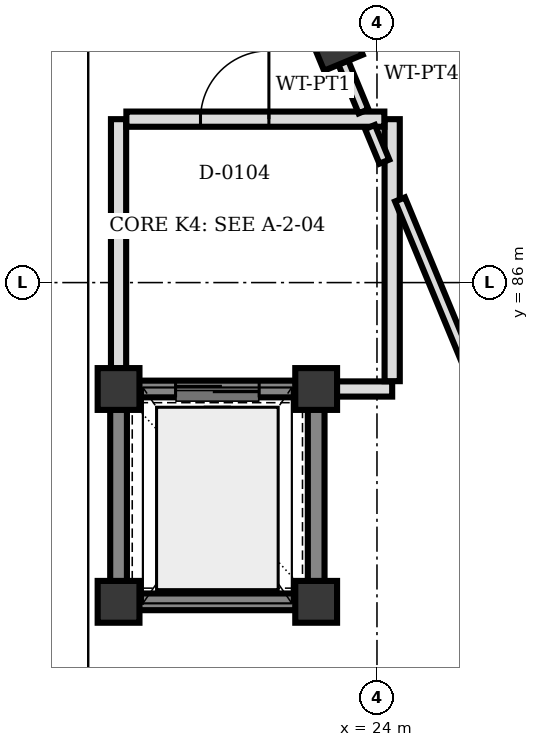
"""IFC4 building model, lengths in metres.
Left out: names, types, materials, properties, quantities, classifications, styles, units other than length and angle.
Written with IfcOpenShell. Run it as: python <this file> out.ifc"""

import sys

from ifc_helpers import new_model, si_unit, direction, frame, frame_2d, origin, origin_2d, place, context, subcontext, project, spatial, rectangle, extrude, element, fill, save


model = new_model("IFC4")
c1 = context("Model", 3, precision=1e-05, world=origin(), true_north=direction((0.0, 1.0)))
c2 = subcontext(c1, "Body", "Model", "MODEL_VIEW")
j1 = project(units=[si_unit("LENGTHUNIT", "METRE"), si_unit("PLANEANGLEUNIT", "RADIAN")], contexts=[c1])
p1 = place(None, origin())
s1 = spatial("IfcSite", under=j1, at=p1, CompositionType="ELEMENT")
p2 = place(p1, origin())
s2 = spatial("IfcBuilding", under=s1, at=p2, CompositionType="ELEMENT")
p3 = place(p2, frame((0.0, 0.0, 12.5)))
s3 = spatial("IfcBuildingStorey", under=s2, at=p3, CompositionType="ELEMENT", Elevation=12.5)
for number, where, z_axis, x_axis in (
    (1, (20.6, 81.8, 0.0), (0.0, 0.0, 1.0), (1.0, 0.0, 0.0)),
    (2, (23.2, 81.8, 0.0), (0.0, 0.0, 1.0), (1.0, 0.0, 0.0)),
    (3, (23.2, 84.6, 0.0), (0.0, 0.0, 1.0), (1.0, 0.0, 0.0)),
    (4, (20.6, 84.6, 0.0), (0.0, 0.0, 1.0), (1.0, 0.0, 0.0)),
):
    element("IfcColumn", number, at=place(p3, frame(where, z_axis=z_axis, x_axis=x_axis)), inside=s3, PredefinedType="COLUMN", context=c2, shape_type="SweptSolid", body=[
        extrude(rectangle(XDim=0.55, YDim=0.55, at=origin_2d()), origin(), (0.0, 0.0, 1.0), 4.0),
    ])
p4 = place(p3, frame((23.453, 89.147, 0.0), z_axis=(0.0, 0.0, 1.0), x_axis=(0.382683432365, -0.923879532511, 0.0)))
e5 = element("IfcColumn", 5, at=p4, inside=s3, PredefinedType="COLUMN", context=c2, shape_type="SweptSolid", body=[
    extrude(rectangle(XDim=0.55, YDim=0.55, at=origin_2d()), origin(), (0.0, 0.0, 1.0), 4.49),
])
p5 = place(p3, frame((20.867, 81.8, 0.0), z_axis=(0.0, 0.0, 1.0), x_axis=(1.0, 0.0, 0.0)))
e6 = element("IfcWall", 6, at=p5, inside=s3, PredefinedType="SHEAR", context=c2, shape_type="SweptSolid", body=[
    extrude(rectangle(XDim=2.066, YDim=0.22, at=frame_2d((1.033, 0.0))), origin(), (0.0, 0.0, 1.0), 3.74),
])
p6 = place(p3, frame((23.2, 82.067, 0.0), z_axis=(0.0, 0.0, 1.0), x_axis=(0.0, 1.0, 0.0)))
e7 = element("IfcWall", 7, at=p6, inside=s3, PredefinedType="SHEAR", context=c2, shape_type="SweptSolid", body=[
    extrude(rectangle(XDim=2.266, YDim=0.22, at=frame_2d((1.133, 0.0))), origin(), (0.0, 0.0, 1.0), 3.74),
])
p7 = place(p3, frame((22.933, 84.6, 0.0), z_axis=(0.0, 0.0, 1.0), x_axis=(-1.0, 0.0, 0.0)))
e8 = element("IfcWall", 8, at=p7, inside=s3, PredefinedType="SHEAR", context=c2, shape_type="SweptSolid", body=[
    extrude(rectangle(XDim=2.066, YDim=0.22, at=frame_2d((1.033, 0.0))), origin(), (0.0, 0.0, 1.0), 3.74),
])
p8 = place(p7, frame((0.483, 0.0, 0.0)))
e9 = element("IfcOpeningElement", 9, at=p8, cuts=e8, PredefinedType="OPENING", context=c2, shape_type="SweptSolid", body=[
    extrude(rectangle(XDim=1.1, YDim=2.15, at=frame_2d((0.55, 1.075))), frame((0.0, 0.12, 0.0), z_axis=(0.0, -1.0, 0.0), x_axis=(1.0, 0.0, 0.0)), (0.0, 0.0, 1.0), 0.24),
])
p9 = place(p3, frame((20.6, 84.333, 0.0), z_axis=(0.0, 0.0, 1.0), x_axis=(0.0, -1.0, 0.0)))
e10 = element("IfcWall", 10, at=p9, inside=s3, PredefinedType="SHEAR", context=c2, shape_type="SweptSolid", body=[
    extrude(rectangle(XDim=2.266, YDim=0.22, at=frame_2d((1.133, 0.0))), origin(), (0.0, 0.0, 1.0), 3.74),
])
p10 = place(p3, frame((23.467, 84.6, 0.0), z_axis=(0.0, 0.0, 1.0), x_axis=(1.0, 0.0, 0.0)))
e11 = element("IfcWall", 11, at=p10, inside=s3, PredefinedType="PARTITIONING", context=c2, shape_type="SweptSolid", body=[
    extrude(rectangle(XDim=0.733, YDim=0.2, at=frame_2d((0.366, 0.0))), origin(), (0.0, 0.0, 1.0), 3.7),
])
p11 = place(p3, frame((20.6, 84.867, 0.0), z_axis=(0.0, 0.0, 1.0), x_axis=(0.0, 1.0, 0.0)))
e12 = element("IfcWall", 12, at=p11, inside=s3, PredefinedType="PARTITIONING", context=c2, shape_type="SweptSolid", body=[
    extrude(rectangle(XDim=3.283, YDim=0.2, at=frame_2d((1.642, 0.0))), origin(), (0.0, 0.0, 1.0), 3.7),
])
p12 = place(p3, frame((24.2, 84.703, 0.0), z_axis=(0.0, 0.0, 1.0), x_axis=(0.0, 1.0, 0.0)))
e13 = element("IfcWall", 13, at=p12, inside=s3, PredefinedType="PARTITIONING", context=c2, shape_type="SweptSolid", body=[
    extrude(rectangle(XDim=3.447, YDim=0.2, at=frame_2d((1.724, 0.0))), origin(), (0.0, 0.0, 1.0), 3.7),
])
p13 = place(p3, frame((20.703, 88.15, 0.0), z_axis=(0.0, 0.0, 1.0), x_axis=(1.0, 0.0, 0.0)))
e14 = element("IfcWall", 14, at=p13, inside=s3, PredefinedType="PARTITIONING", context=c2, shape_type="SweptSolid", body=[
    extrude(rectangle(XDim=3.394, YDim=0.2, at=frame_2d((1.697, 0.0))), origin(), (0.0, 0.0, 1.0), 3.7),
])
p14 = place(p13, frame((0.975, 0.0, 0.0)))
e15 = element("IfcOpeningElement", 15, at=p14, cuts=e14, PredefinedType="OPENING", context=c2, shape_type="SweptSolid", body=[
    extrude(rectangle(XDim=0.9, YDim=2.2, at=frame_2d((0.45, 1.1))), frame((0.0, 0.11, 0.0), z_axis=(0.0, -1.0, 0.0), x_axis=(1.0, 0.0, 0.0)), (0.0, 0.0, 1.0), 0.22),
])
p15 = place(p3, frame((23.555, 88.9, 0.0), z_axis=(0.0, 0.0, 1.0), x_axis=(0.38278283439, -0.923838352579, 0.0)))
e16 = element("IfcWall", 16, at=p15, inside=s3, PredefinedType="PARTITIONING", context=c2, shape_type="SweptSolid", body=[
    extrude(rectangle(XDim=0.7, YDim=0.14, at=frame_2d((0.35, 0.0))), origin(), (0.0, 0.0, 1.0), 3.7),
])
p16 = place(p3, frame((23.908, 88.047, 0.0), z_axis=(0.0, 0.0, 1.0), x_axis=(0.3827885685, -0.92383597669, 0.0)))
e17 = element("IfcWall", 17, at=p16, inside=s3, PredefinedType="PARTITIONING", context=c2, shape_type="SweptSolid", body=[
    extrude(rectangle(XDim=0.494, YDim=0.14, at=frame_2d((0.247, 0.0))), origin(), (0.0, 0.0, 1.0), 3.7),
])
p17 = place(p3, frame((24.303, 87.094, 0.0), z_axis=(0.0, 0.0, 1.0), x_axis=(0.382682035927, -0.923880110934, 0.0)))
e18 = element("IfcWall", 18, at=p17, inside=s3, PredefinedType="PARTITIONING", context=c2, shape_type="SweptSolid", body=[
    extrude(rectangle(XDim=6.486, YDim=0.14, at=frame_2d((3.243, 0.0))), origin(), (0.0, 0.0, 1.0), 3.7),
])
p18 = place(p8, origin())
e19 = element("IfcDoor", 19, at=p18, inside=s3, OperationType="DOUBLE_DOOR_SLIDING", PredefinedType="DOOR", context=c2, shape_type="SweptSolid", body=[
    extrude(rectangle(XDim=1.1, YDim=2.15, at=frame_2d((0.55, 1.075))), frame((0.0, 0.025, 0.0), z_axis=(0.0, -1.0, 0.0), x_axis=(1.0, 0.0, 0.0)), (0.0, 0.0, 1.0), 0.05),
])
fill(e9, e19)
p19 = place(p14, origin())
e20 = element("IfcDoor", 20, at=p19, inside=s3, OperationType="SINGLE_SWING_RIGHT", PredefinedType="DOOR", context=c2, shape_type="SweptSolid", body=[
    extrude(rectangle(XDim=0.9, YDim=2.2, at=frame_2d((0.45, 1.1))), frame((0.0, 0.025, 0.0), z_axis=(0.0, -1.0, 0.0), x_axis=(1.0, 0.0, 0.0)), (0.0, 0.0, 1.0), 0.05),
])
fill(e15, e20)
save(model, sys.argv[1])
